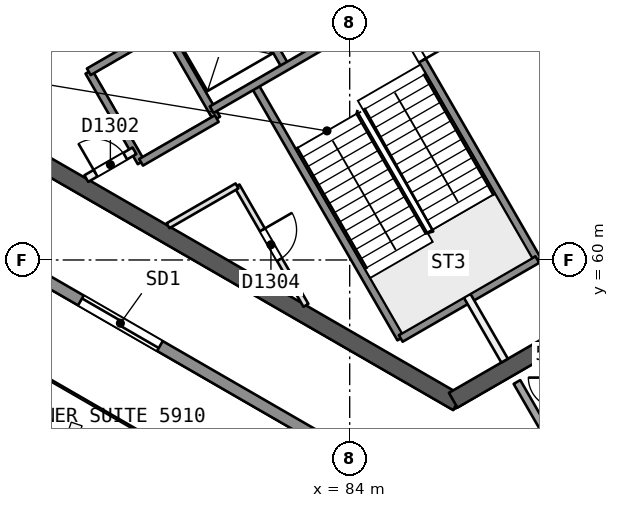
"""IFC4 building model, lengths in metres.
Left out: names, types, materials, properties, quantities, classifications, styles, units other than length and angle.
Written with IfcOpenShell. Run it as: python <this file> out.ifc"""

import sys

from ifc_helpers import new_model, si_unit, direction, frame, frame_2d, origin, place, context, subcontext, project, spatial, rectangle, extrude, element, fill, save


model = new_model("IFC4")
c1 = context("Model", 3, precision=1e-05, world=origin(), true_north=direction((0.0, 1.0)))
c2 = subcontext(c1, "Body", "Model", "MODEL_VIEW")
j1 = project(units=[si_unit("LENGTHUNIT", "METRE"), si_unit("PLANEANGLEUNIT", "RADIAN")], contexts=[c1])
p1 = place(None, origin())
s1 = spatial("IfcSite", under=j1, at=p1, CompositionType="ELEMENT")
p2 = place(p1, origin())
s2 = spatial("IfcBuilding", under=s1, at=p2, CompositionType="ELEMENT")
p3 = place(p2, frame((0.0, 0.0, 239.1)))
s3 = spatial("IfcBuildingStorey", under=s2, at=p3, CompositionType="ELEMENT", Elevation=239.1)
p4 = place(p3, frame((79.63, 71.981, 0.0), z_axis=(0.0, 0.0, 1.0), x_axis=(-0.500002171595, -0.86602415001, 0.0)))
e1 = element("IfcWall", 1, at=p4, inside=s3, PredefinedType="SHEAR", context=c2, shape_type="SweptSolid", body=[
    extrude(rectangle(XDim=10.25, YDim=0.45, at=frame_2d((5.125, 0.0))), origin(), (0.0, 0.0, 1.0), 3.7),
])
p5 = place(p4, frame((0.82, 0.0, 0.0)))
e2 = element("IfcOpeningElement", 2, at=p5, cuts=e1, PredefinedType="OPENING", context=c2, shape_type="SweptSolid", body=[
    extrude(rectangle(XDim=1.2, YDim=2.1, at=frame_2d((0.6, 1.05))), frame((0.0, 0.235, 0.0), z_axis=(0.0, -1.0, 0.0), x_axis=(1.0, 0.0, 0.0)), (0.0, 0.0, 1.0), 0.471),
])
p6 = place(p3, frame((74.617, 63.299, 0.0), z_axis=(0.0, 0.0, 1.0), x_axis=(0.86602594008, -0.499999071108, 0.0)))
e3 = element("IfcWall", 3, at=p6, inside=s3, PredefinedType="SHEAR", context=c2, shape_type="SweptSolid", body=[
    extrude(rectangle(XDim=14.108, YDim=0.45, at=frame_2d((7.054, 0.0))), origin(), (0.0, 0.0, 1.0), 3.7),
])
p7 = place(p3, frame((86.723, 56.31, 0.0), z_axis=(0.0, 0.0, 1.0), x_axis=(0.866042179588, 0.49997094233, 0.0)))
e4 = element("IfcWall", 4, at=p7, inside=s3, PredefinedType="SHEAR", context=c2, shape_type="SweptSolid", body=[
    extrude(rectangle(XDim=3.515, YDim=0.45, at=frame_2d((1.758, 0.0))), origin(), (0.0, 0.0, 1.0), 3.7),
])
p8 = place(p3, frame((88.402, 56.789, 0.0), z_axis=(0.0, 0.0, 1.0), x_axis=(0.500023670775, -0.866011737025, 0.0)))
e5 = element("IfcWall", 5, at=p8, inside=s3, PredefinedType="PARTITIONING", context=c2, shape_type="SweptSolid", body=[
    extrude(rectangle(XDim=3.204, YDim=0.2, at=frame_2d((1.602, 0.0))), origin(), (0.0, 0.0, 1.0), 3.3),
])
p9 = place(p3, frame((87.876, 52.614, 0.0), z_axis=(0.0, 0.0, 1.0), x_axis=(-0.866025459945, 0.499999902727, 0.0)))
e6 = element("IfcWall", 6, at=p9, inside=s3, PredefinedType="SOLIDWALL", context=c2, shape_type="SweptSolid", body=[
    extrude(rectangle(XDim=49.688, YDim=0.3, at=frame_2d((24.844, 0.0))), origin(), (0.0, 0.0, 1.0), 3.3),
])
p10 = place(p9, frame((23.956, 0.0, 0.0)))
e7 = element("IfcOpeningElement", 7, at=p10, cuts=e6, PredefinedType="OPENING", context=c2, shape_type="SweptSolid", body=[
    extrude(rectangle(XDim=2.4, YDim=2.4, at=frame_2d((1.2, 1.2))), frame((0.0, 0.161, 0.0), z_axis=(0.0, -1.0, 0.0), x_axis=(1.0, 0.0, 0.0)), (0.0, 0.0, 1.0), 0.321),
])
p11 = place(p9, frame((37.357, 0.0, 0.0)))
e8 = element("IfcOpeningElement", 8, at=p11, cuts=e6, PredefinedType="OPENING", context=c2, shape_type="SweptSolid", body=[
    extrude(rectangle(XDim=2.4, YDim=2.4, at=frame_2d((1.2, 1.2))), frame((0.0, 0.161, 0.0), z_axis=(0.0, -1.0, 0.0), x_axis=(1.0, 0.0, 0.0)), (0.0, 0.0, 1.0), 0.321),
])
p12 = place(p9, frame((10.243, 0.0, 0.0)))
e9 = element("IfcOpeningElement", 9, at=p12, cuts=e6, PredefinedType="OPENING", context=c2, shape_type="SweptSolid", body=[
    extrude(rectangle(XDim=2.4, YDim=2.4, at=frame_2d((1.2, 1.2))), frame((0.0, 0.161, 0.0), z_axis=(0.0, -1.0, 0.0), x_axis=(1.0, 0.0, 0.0)), (0.0, 0.0, 1.0), 0.321),
])
p13 = place(p3, frame((77.135, 64.952, 0.0), z_axis=(0.0, 0.0, 1.0), x_axis=(0.499996545922, -0.866027397988, 0.0)))
e10 = element("IfcWall", 10, at=p13, inside=s3, PredefinedType="SOLIDWALL", context=c2, shape_type="SweptSolid", body=[
    extrude(rectangle(XDim=2.75, YDim=0.2, at=frame_2d((1.375, 0.0))), origin(), (0.0, 0.0, 1.0), 3.3),
])
p14 = place(p3, frame((81.034, 61.949, 0.0), z_axis=(0.0, 0.0, 1.0), x_axis=(0.499945732631, -0.866056732798, 0.0)))
e11 = element("IfcWall", 11, at=p14, inside=s3, PredefinedType="PARTITIONING", context=c2, shape_type="SweptSolid", body=[
    extrude(rectangle(XDim=3.628, YDim=0.15, at=frame_2d((1.814, 0.0))), origin(), (0.0, 0.0, 1.0), 3.3),
])
p15 = place(p14, frame((1.337, 0.0, 0.0)))
e12 = element("IfcOpeningElement", 12, at=p15, cuts=e11, PredefinedType="OPENING", context=c2, shape_type="SweptSolid", body=[
    extrude(rectangle(XDim=0.9, YDim=2.1, at=frame_2d((0.45, 1.05))), frame((0.0, 0.085, 0.0), z_axis=(0.0, -1.0, 0.0), x_axis=(1.0, 0.0, 0.0)), (0.0, 0.0, 1.0), 0.171),
])
p16 = place(p3, frame((79.127, 66.102, 0.0), z_axis=(0.0, 0.0, 1.0), x_axis=(0.499996545922, -0.866027397988, 0.0)))
e13 = element("IfcWall", 13, at=p16, inside=s3, PredefinedType="SOLIDWALL", context=c2, shape_type="SweptSolid", body=[
    extrude(rectangle(XDim=2.75, YDim=0.2, at=frame_2d((1.375, 0.0))), origin(), (0.0, 0.0, 1.0), 3.3),
])
p17 = place(p3, frame((81.493, 64.604, 0.0), z_axis=(0.0, 0.0, 1.0), x_axis=(0.500006057782, -0.866021906294, 0.0)))
e14 = element("IfcWall", 14, at=p17, inside=s3, PredefinedType="SOLIDWALL", context=c2, shape_type="SweptSolid", body=[
    extrude(rectangle(XDim=7.7, YDim=0.2, at=frame_2d((3.85, 0.0))), origin(), (0.0, 0.0, 1.0), 3.3),
])
p18 = place(p3, frame((81.076, 67.227, 0.0), z_axis=(0.0, 0.0, 1.0), x_axis=(0.50000366821, -0.866023285932, 0.0)))
e15 = element("IfcWall", 15, at=p18, inside=s3, PredefinedType="SOLIDWALL", context=c2, shape_type="SweptSolid", body=[
    extrude(rectangle(XDim=2.48, YDim=0.2, at=frame_2d((1.24, 0.0))), origin(), (0.0, 0.0, 1.0), 3.3),
])
p19 = place(p3, frame((87.09, 59.06, 0.0), z_axis=(0.0, 0.0, 1.0), x_axis=(0.500011643316, -0.866018681408, 0.0)))
e16 = element("IfcWall", 16, at=p19, inside=s3, PredefinedType="PARTITIONING", context=c2, shape_type="SweptSolid", body=[
    extrude(rectangle(XDim=1.973, YDim=0.2, at=frame_2d((0.987, 0.0))), origin(), (0.0, 0.0, 1.0), 3.3),
])
p20 = place(p3, frame((85.087, 66.679, 0.0), z_axis=(0.0, 0.0, 1.0), x_axis=(0.500019787375, -0.866013979237, 0.0)))
e17 = element("IfcWall", 17, at=p20, inside=s3, PredefinedType="SOLIDWALL", context=c2, shape_type="SweptSolid", body=[
    extrude(rectangle(XDim=7.7, YDim=0.2, at=frame_2d((3.85, 0.0))), origin(), (0.0, 0.0, 1.0), 3.3),
])
p21 = place(p20, frame((0.55, 0.0, 0.0)))
e18 = element("IfcOpeningElement", 18, at=p21, cuts=e17, PredefinedType="OPENING", context=c2, shape_type="SweptSolid", body=[
    extrude(rectangle(XDim=1.1, YDim=2.1, at=frame_2d((0.55, 1.05))), frame((0.0, 0.11, 0.0), z_axis=(0.0, -1.0, 0.0), x_axis=(1.0, 0.0, 0.0)), (0.0, 0.0, 1.0), 0.221),
])
p22 = place(p3, frame((77.135, 64.952, 0.0), z_axis=(0.0, 0.0, 1.0), x_axis=(0.866031916153, 0.499988720078, 0.0)))
e19 = element("IfcWall", 19, at=p22, inside=s3, PredefinedType="SOLIDWALL", context=c2, shape_type="SweptSolid", body=[
    extrude(rectangle(XDim=11.35, YDim=0.2, at=frame_2d((5.675, 0.0))), origin(), (0.0, 0.0, 1.0), 3.3),
])
p23 = place(p22, frame((2.875, 0.0, 0.0)))
e20 = element("IfcOpeningElement", 20, at=p23, cuts=e19, PredefinedType="OPENING", context=c2, shape_type="SweptSolid", body=[
    extrude(rectangle(XDim=1.1, YDim=2.1, at=frame_2d((0.55, 1.05))), frame((0.0, 0.11, 0.0), z_axis=(0.0, -1.0, 0.0), x_axis=(1.0, 0.0, 0.0)), (0.0, 0.0, 1.0), 0.221),
])
p24 = place(p22, frame((5.125, 0.0, 0.0)))
e21 = element("IfcOpeningElement", 21, at=p24, cuts=e19, PredefinedType="OPENING", context=c2, shape_type="SweptSolid", body=[
    extrude(rectangle(XDim=1.1, YDim=2.1, at=frame_2d((0.55, 1.05))), frame((0.0, 0.11, 0.0), z_axis=(0.0, -1.0, 0.0), x_axis=(1.0, 0.0, 0.0)), (0.0, 0.0, 1.0), 0.221),
])
p25 = place(p22, frame((7.375, 0.0, 0.0)))
e22 = element("IfcOpeningElement", 22, at=p25, cuts=e19, PredefinedType="OPENING", context=c2, shape_type="SweptSolid", body=[
    extrude(rectangle(XDim=1.1, YDim=2.1, at=frame_2d((0.55, 1.05))), frame((0.0, 0.11, 0.0), z_axis=(0.0, -1.0, 0.0), x_axis=(1.0, 0.0, 0.0)), (0.0, 0.0, 1.0), 0.221),
])
p26 = place(p3, frame((77.07, 62.143, 0.0), z_axis=(0.0, 0.0, 1.0), x_axis=(0.866013036001, 0.500021421018, 0.0)))
e23 = element("IfcWall", 23, at=p26, inside=s3, PredefinedType="PARTITIONING", context=c2, shape_type="SweptSolid", body=[
    extrude(rectangle(XDim=1.461, YDim=0.2, at=frame_2d((0.73, 0.0))), origin(), (0.0, 0.0, 1.0), 3.3),
])
p27 = place(p26, frame((0.281, 0.0, 0.0)))
e24 = element("IfcOpeningElement", 24, at=p27, cuts=e23, PredefinedType="OPENING", context=c2, shape_type="SweptSolid", body=[
    extrude(rectangle(XDim=0.9, YDim=2.1, at=frame_2d((0.45, 1.05))), frame((0.0, 0.11, 0.0), z_axis=(0.0, -1.0, 0.0), x_axis=(1.0, 0.0, 0.0)), (0.0, 0.0, 1.0), 0.221),
])
p28 = place(p3, frame((80.367, 63.954, 0.0), z_axis=(0.0, 0.0, 1.0), x_axis=(0.866026575979, 0.499997969693, 0.0)))
e25 = element("IfcWall", 25, at=p28, inside=s3, PredefinedType="SOLIDWALL", context=c2, shape_type="SweptSolid", body=[
    extrude(rectangle(XDim=6.75, YDim=0.2, at=frame_2d((3.375, 0.0))), origin(), (0.0, 0.0, 1.0), 3.3),
])
p29 = place(p3, frame((78.51, 62.57, 0.0), z_axis=(0.0, 0.0, 1.0), x_axis=(0.866053019151, 0.499952165731, 0.0)))
e26 = element("IfcWall", 26, at=p29, inside=s3, PredefinedType="SOLIDWALL", context=c2, shape_type="SweptSolid", body=[
    extrude(rectangle(XDim=2.3, YDim=0.2, at=frame_2d((1.15, 0.0))), origin(), (0.0, 0.0, 1.0), 3.3),
])
p30 = place(p3, frame((79.22, 60.901, 0.0), z_axis=(0.0, 0.0, 1.0), x_axis=(0.866040030748, 0.499974664501, 0.0)))
e27 = element("IfcWall", 27, at=p30, inside=s3, PredefinedType="PARTITIONING", context=c2, shape_type="SweptSolid", body=[
    extrude(rectangle(XDim=2.095, YDim=0.15, at=frame_2d((1.047, 0.0))), origin(), (0.0, 0.0, 1.0), 3.3),
])
p31 = place(p3, frame((85.343, 57.935, 0.0), z_axis=(0.0, 0.0, 1.0), x_axis=(0.866004344652, 0.500036473714, 0.0)))
e28 = element("IfcWall", 28, at=p31, inside=s3, PredefinedType="SOLIDWALL", context=c2, shape_type="SweptSolid", body=[
    extrude(rectangle(XDim=4.15, YDim=0.2, at=frame_2d((2.075, 0.0))), origin(), (0.0, 0.0, 1.0), 3.3),
])
p32 = place(p12, origin())
e29 = element("IfcDoor", 29, at=p32, inside=s3, OperationType="SLIDING_TO_LEFT", PredefinedType="NOTDEFINED", context=c2, shape_type="SweptSolid", body=[
    extrude(rectangle(XDim=2.4, YDim=2.4, at=frame_2d((1.2, 1.2))), frame((0.0, 0.025, 0.0), z_axis=(0.0, -1.0, 0.0), x_axis=(1.0, 0.0, 0.0)), (0.0, 0.0, 1.0), 0.05),
])
fill(e9, e29)
p33 = place(p27, origin())
e30 = element("IfcDoor", 30, at=p33, inside=s3, OperationType="SINGLE_SWING_LEFT", PredefinedType="NOTDEFINED", context=c2, shape_type="SweptSolid", body=[
    extrude(rectangle(XDim=0.9, YDim=2.1, at=frame_2d((0.45, 1.05))), frame((0.0, 0.025, 0.0), z_axis=(0.0, -1.0, 0.0), x_axis=(1.0, 0.0, 0.0)), (0.0, 0.0, 1.0), 0.05),
])
fill(e24, e30)
p34 = place(p21, origin())
e31 = element("IfcDoor", 31, at=p34, inside=s3, OperationType="SINGLE_SWING_RIGHT", PredefinedType="NOTDEFINED", context=c2, shape_type="SweptSolid", body=[
    extrude(rectangle(XDim=1.1, YDim=2.1, at=frame_2d((0.55, 1.05))), frame((0.0, 0.025, 0.0), z_axis=(0.0, -1.0, 0.0), x_axis=(1.0, 0.0, 0.0)), (0.0, 0.0, 1.0), 0.05),
])
fill(e18, e31)
p35 = place(p15, origin())
e32 = element("IfcDoor", 32, at=p35, inside=s3, OperationType="SINGLE_SWING_LEFT", PredefinedType="NOTDEFINED", context=c2, shape_type="SweptSolid", body=[
    extrude(rectangle(XDim=0.9, YDim=2.1, at=frame_2d((0.45, 1.05))), frame((0.0, 0.025, 0.0), z_axis=(0.0, -1.0, 0.0), x_axis=(1.0, 0.0, 0.0)), (0.0, 0.0, 1.0), 0.05),
])
fill(e12, e32)
save(model, sys.argv[1])
